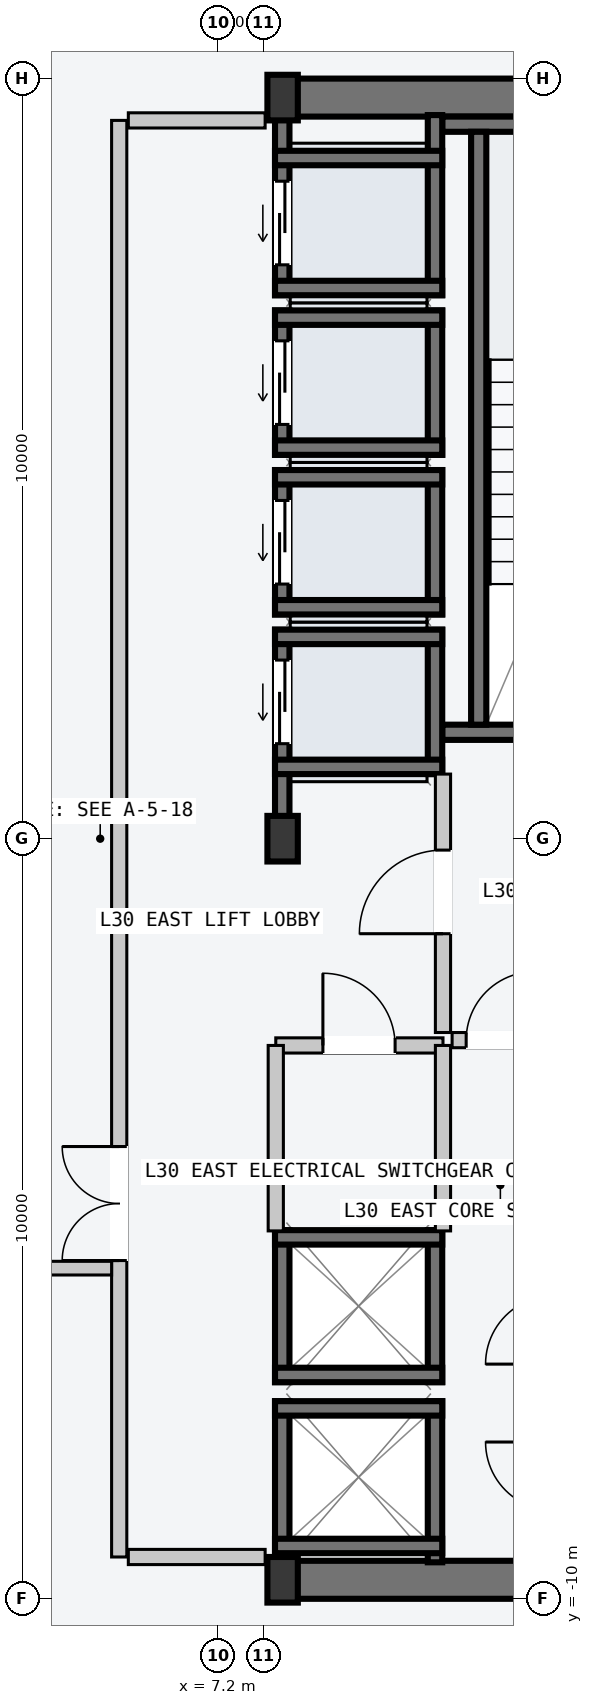
"""IFC4 building model, lengths in metres.
Left out: names, types, materials, properties, quantities, classifications, styles, units other than length and angle.
Written with IfcOpenShell. Run it as: python <this file> out.ifc"""

import sys

from ifc_helpers import new_model, si_unit, direction, frame, frame_2d, origin, origin_2d, place, context, subcontext, project, spatial, rectangle, i_section, extrude, element, fill, save


model = new_model("IFC4")
c1 = context("Model", 3, precision=1e-05, world=origin(), true_north=direction((0.0, 1.0)))
c2 = subcontext(c1, "Body", "Model", "MODEL_VIEW")
j1 = project(units=[si_unit("LENGTHUNIT", "METRE"), si_unit("PLANEANGLEUNIT", "RADIAN")], contexts=[c1])
p1 = place(None, origin())
s1 = spatial("IfcSite", under=j1, at=p1, CompositionType="ELEMENT")
p2 = place(p1, origin())
s2 = spatial("IfcBuilding", under=s1, at=p2, CompositionType="ELEMENT")
p3 = place(p2, frame((0.0, 0.0, 117.0)))
s3 = spatial("IfcBuildingStorey", under=s2, at=p3, CompositionType="ELEMENT", Elevation=117.0)
for number, where, z_axis, x_axis in (
    (1, (8.07, -9.75, -0.2), (0.0, 0.0, 1.0), (1.0, 0.0, 0.0)),
    (2, (8.07, 9.75, -0.2), (0.0, 0.0, 1.0), (1.0, 0.0, 0.0)),
):
    element("IfcWall", number, at=place(p3, frame(where, z_axis=z_axis, x_axis=x_axis)), inside=s3, PredefinedType="SHEAR", context=c2, shape_type="SweptSolid", body=[
        extrude(rectangle(XDim=6.46, YDim=0.5, at=frame_2d((3.23, 0.0))), origin(), (0.0, 0.0, 1.0), 3.6),
    ])
p4 = place(p3, frame((10.15, 1.4, -0.2), z_axis=(0.0, 0.0, 1.0), x_axis=(1.0, 0.0, 0.0)))
e3 = element("IfcWall", 3, at=p4, inside=s3, PredefinedType="SOLIDWALL", context=c2, shape_type="SweptSolid", body=[
    extrude(rectangle(XDim=4.1, YDim=0.2, at=frame_2d((2.05, 0.0))), origin(), (0.0, 0.0, 1.0), 3.6),
])
p5 = place(p4, frame((1.5, 0.0, 0.2)))
e4 = element("IfcOpeningElement", 4, at=p5, cuts=e3, PredefinedType="OPENING", context=c2, shape_type="SweptSolid", body=[
    extrude(rectangle(XDim=1.12, YDim=2.18, at=frame_2d((0.56, 1.09))), frame((0.0, 0.11, 0.0), z_axis=(0.0, -1.0, 0.0), x_axis=(1.0, 0.0, 0.0)), (0.0, 0.0, 1.0), 0.22),
])
p6 = place(p3, frame((10.15, 9.4, -0.2), z_axis=(0.0, 0.0, 1.0), x_axis=(1.0, 0.0, 0.0)))
e5 = element("IfcWall", 5, at=p6, inside=s3, PredefinedType="SOLIDWALL", context=c2, shape_type="SweptSolid", body=[
    extrude(rectangle(XDim=4.1, YDim=0.2, at=frame_2d((2.05, 0.0))), origin(), (0.0, 0.0, 1.0), 3.6),
])
p7 = place(p3, frame((10.63, 1.5, -0.2), z_axis=(0.0, 0.0, 1.0), x_axis=(0.0, 1.0, 0.0)))
e6 = element("IfcWall", 6, at=p7, inside=s3, PredefinedType="SOLIDWALL", context=c2, shape_type="SweptSolid", body=[
    extrude(rectangle(XDim=7.8, YDim=0.2, at=frame_2d((3.9, 0.0))), origin(), (0.0, 0.0, 1.0), 3.6),
])
for number, where, z_axis, x_axis in (
    (7, (8.05, -9.75, 0.0), (0.0, 0.0, 1.0), (1.0, 0.0, 0.0)),
    (8, (8.05, 0.0, 0.0), (0.0, 0.0, 1.0), (1.0, 0.0, 0.0)),
    (9, (8.05, 9.75, 0.0), (0.0, 0.0, 1.0), (1.0, 0.0, 0.0)),
):
    element("IfcColumn", number, at=place(p3, frame(where, z_axis=z_axis, x_axis=x_axis)), inside=s3, PredefinedType="COLUMN", context=c2, shape_type="SweptSolid", body=[
        extrude(i_section(OverallWidth=0.4, OverallDepth=0.6, WebThickness=0.022, FlangeThickness=0.036, at=origin_2d()), origin(), (0.0, 0.0, 1.0), 3.6),
    ])
p8 = place(p3, frame((8.045, 0.21, -0.2), z_axis=(0.0, 0.0, 1.0), x_axis=(0.0, 1.0, 0.0)))
e10 = element("IfcWall", 10, at=p8, inside=s3, PredefinedType="SOLIDWALL", context=c2, shape_type="SweptSolid", body=[
    extrude(rectangle(XDim=2.54, YDim=0.19, at=frame_2d((1.27, 0.0))), origin(), (0.0, 0.0, 1.0), 3.6),
])
p9 = place(p8, frame((1.04, 0.0, 0.2)))
e11 = element("IfcOpeningElement", 11, at=p9, cuts=e10, PredefinedType="OPENING", context=c2, shape_type="SweptSolid", body=[
    extrude(rectangle(XDim=1.1, YDim=2.2, at=frame_2d((0.55, 1.1))), frame((0.0, 0.105, 0.0), z_axis=(0.0, -1.0, 0.0), x_axis=(1.0, 0.0, 0.0)), (0.0, 0.0, 1.0), 0.21),
])
p10 = place(p3, frame((10.055, 0.85, -0.2), z_axis=(0.0, 0.0, 1.0), x_axis=(0.0, 1.0, 0.0)))
e12 = element("IfcWall", 12, at=p10, inside=s3, PredefinedType="SOLIDWALL", context=c2, shape_type="SweptSolid", body=[
    extrude(rectangle(XDim=1.9, YDim=0.19, at=frame_2d((0.95, 0.0))), origin(), (0.0, 0.0, 1.0), 3.6),
])
for number, where, z_axis, x_axis in (
    (13, (7.95, 2.655, -0.2), (0.0, 0.0, 1.0), (1.0, 0.0, 0.0)),
    (14, (7.95, 0.945, -0.2), (0.0, 0.0, 1.0), (1.0, 0.0, 0.0)),
):
    element("IfcWall", number, at=place(p3, frame(where, z_axis=z_axis, x_axis=x_axis)), inside=s3, PredefinedType="SOLIDWALL", context=c2, shape_type="SweptSolid", body=[
        extrude(rectangle(XDim=2.2, YDim=0.19, at=frame_2d((1.1, 0.0))), origin(), (0.0, 0.0, 1.0), 3.6),
    ])
p11 = place(p3, frame((8.045, 2.95, -0.2), z_axis=(0.0, 0.0, 1.0), x_axis=(0.0, 1.0, 0.0)))
e15 = element("IfcWall", 15, at=p11, inside=s3, PredefinedType="SOLIDWALL", context=c2, shape_type="SweptSolid", body=[
    extrude(rectangle(XDim=1.9, YDim=0.19, at=frame_2d((0.95, 0.0))), origin(), (0.0, 0.0, 1.0), 3.6),
])
p12 = place(p11, frame((0.4, 0.0, 0.2)))
e16 = element("IfcOpeningElement", 16, at=p12, cuts=e15, PredefinedType="OPENING", context=c2, shape_type="SweptSolid", body=[
    extrude(rectangle(XDim=1.1, YDim=2.2, at=frame_2d((0.55, 1.1))), frame((0.0, 0.105, 0.0), z_axis=(0.0, -1.0, 0.0), x_axis=(1.0, 0.0, 0.0)), (0.0, 0.0, 1.0), 0.21),
])
p13 = place(p3, frame((10.055, 2.95, -0.2), z_axis=(0.0, 0.0, 1.0), x_axis=(0.0, 1.0, 0.0)))
e17 = element("IfcWall", 17, at=p13, inside=s3, PredefinedType="SOLIDWALL", context=c2, shape_type="SweptSolid", body=[
    extrude(rectangle(XDim=1.9, YDim=0.19, at=frame_2d((0.95, 0.0))), origin(), (0.0, 0.0, 1.0), 3.6),
])
for number, where, z_axis, x_axis in (
    (18, (7.95, 4.755, -0.2), (0.0, 0.0, 1.0), (1.0, 0.0, 0.0)),
    (19, (7.95, 3.045, -0.2), (0.0, 0.0, 1.0), (1.0, 0.0, 0.0)),
):
    element("IfcWall", number, at=place(p3, frame(where, z_axis=z_axis, x_axis=x_axis)), inside=s3, PredefinedType="SOLIDWALL", context=c2, shape_type="SweptSolid", body=[
        extrude(rectangle(XDim=2.2, YDim=0.19, at=frame_2d((1.1, 0.0))), origin(), (0.0, 0.0, 1.0), 3.6),
    ])
p14 = place(p3, frame((8.045, 5.05, -0.2), z_axis=(0.0, 0.0, 1.0), x_axis=(0.0, 1.0, 0.0)))
e20 = element("IfcWall", 20, at=p14, inside=s3, PredefinedType="SOLIDWALL", context=c2, shape_type="SweptSolid", body=[
    extrude(rectangle(XDim=1.9, YDim=0.19, at=frame_2d((0.95, 0.0))), origin(), (0.0, 0.0, 1.0), 3.6),
])
p15 = place(p14, frame((0.4, 0.0, 0.2)))
e21 = element("IfcOpeningElement", 21, at=p15, cuts=e20, PredefinedType="OPENING", context=c2, shape_type="SweptSolid", body=[
    extrude(rectangle(XDim=1.1, YDim=2.2, at=frame_2d((0.55, 1.1))), frame((0.0, 0.105, 0.0), z_axis=(0.0, -1.0, 0.0), x_axis=(1.0, 0.0, 0.0)), (0.0, 0.0, 1.0), 0.21),
])
p16 = place(p3, frame((10.055, 5.05, -0.2), z_axis=(0.0, 0.0, 1.0), x_axis=(0.0, 1.0, 0.0)))
e22 = element("IfcWall", 22, at=p16, inside=s3, PredefinedType="SOLIDWALL", context=c2, shape_type="SweptSolid", body=[
    extrude(rectangle(XDim=1.9, YDim=0.19, at=frame_2d((0.95, 0.0))), origin(), (0.0, 0.0, 1.0), 3.6),
])
for number, where, z_axis, x_axis in (
    (23, (7.95, 6.855, -0.2), (0.0, 0.0, 1.0), (1.0, 0.0, 0.0)),
    (24, (7.95, 5.145, -0.2), (0.0, 0.0, 1.0), (1.0, 0.0, 0.0)),
):
    element("IfcWall", number, at=place(p3, frame(where, z_axis=z_axis, x_axis=x_axis)), inside=s3, PredefinedType="SOLIDWALL", context=c2, shape_type="SweptSolid", body=[
        extrude(rectangle(XDim=2.2, YDim=0.19, at=frame_2d((1.1, 0.0))), origin(), (0.0, 0.0, 1.0), 3.6),
    ])
p17 = place(p3, frame((8.045, 7.15, -0.2), z_axis=(0.0, 0.0, 1.0), x_axis=(0.0, 1.0, 0.0)))
e25 = element("IfcWall", 25, at=p17, inside=s3, PredefinedType="SOLIDWALL", context=c2, shape_type="SweptSolid", body=[
    extrude(rectangle(XDim=2.37, YDim=0.19, at=frame_2d((1.185, 0.0))), origin(), (0.0, 0.0, 1.0), 3.6),
])
p18 = place(p17, frame((0.4, 0.0, 0.2)))
e26 = element("IfcOpeningElement", 26, at=p18, cuts=e25, PredefinedType="OPENING", context=c2, shape_type="SweptSolid", body=[
    extrude(rectangle(XDim=1.1, YDim=2.2, at=frame_2d((0.55, 1.1))), frame((0.0, 0.105, 0.0), z_axis=(0.0, -1.0, 0.0), x_axis=(1.0, 0.0, 0.0)), (0.0, 0.0, 1.0), 0.21),
])
p19 = place(p3, frame((10.055, 7.15, -0.2), z_axis=(0.0, 0.0, 1.0), x_axis=(0.0, 1.0, 0.0)))
e27 = element("IfcWall", 27, at=p19, inside=s3, PredefinedType="SOLIDWALL", context=c2, shape_type="SweptSolid", body=[
    extrude(rectangle(XDim=2.37, YDim=0.19, at=frame_2d((1.185, 0.0))), origin(), (0.0, 0.0, 1.0), 3.6),
])
for number, where, z_axis, x_axis in (
    (28, (7.95, 8.955, -0.2), (0.0, 0.0, 1.0), (1.0, 0.0, 0.0)),
    (29, (7.95, 7.245, -0.2), (0.0, 0.0, 1.0), (1.0, 0.0, 0.0)),
):
    element("IfcWall", number, at=place(p3, frame(where, z_axis=z_axis, x_axis=x_axis)), inside=s3, PredefinedType="SOLIDWALL", context=c2, shape_type="SweptSolid", body=[
        extrude(rectangle(XDim=2.2, YDim=0.19, at=frame_2d((1.1, 0.0))), origin(), (0.0, 0.0, 1.0), 3.6),
    ])
for number, where, z_axis, x_axis in (
    (30, (8.045, -9.52, -0.2), (0.0, 0.0, 1.0), (0.0, 1.0, 0.0)),
    (31, (10.055, -9.52, -0.2), (0.0, 0.0, 1.0), (0.0, 1.0, 0.0)),
):
    element("IfcWall", number, at=place(p3, frame(where, z_axis=z_axis, x_axis=x_axis)), inside=s3, PredefinedType="SOLIDWALL", context=c2, shape_type="SweptSolid", body=[
        extrude(rectangle(XDim=2.12, YDim=0.19, at=frame_2d((1.06, 0.0))), origin(), (0.0, 0.0, 1.0), 3.6),
    ])
for number, where, z_axis, x_axis in (
    (32, (7.95, -7.495, -0.2), (0.0, 0.0, 1.0), (1.0, 0.0, 0.0)),
    (33, (7.95, -9.305, -0.2), (0.0, 0.0, 1.0), (1.0, 0.0, 0.0)),
):
    element("IfcWall", number, at=place(p3, frame(where, z_axis=z_axis, x_axis=x_axis)), inside=s3, PredefinedType="SOLIDWALL", context=c2, shape_type="SweptSolid", body=[
        extrude(rectangle(XDim=2.2, YDim=0.19, at=frame_2d((1.1, 0.0))), origin(), (0.0, 0.0, 1.0), 3.6),
    ])
for number, where, z_axis, x_axis in (
    (34, (8.045, -7.15, -0.2), (0.0, 0.0, 1.0), (0.0, 1.0, 0.0)),
    (35, (10.055, -7.15, -0.2), (0.0, 0.0, 1.0), (0.0, 1.0, 0.0)),
):
    element("IfcWall", number, at=place(p3, frame(where, z_axis=z_axis, x_axis=x_axis)), inside=s3, PredefinedType="SOLIDWALL", context=c2, shape_type="SweptSolid", body=[
        extrude(rectangle(XDim=2.0, YDim=0.19, at=frame_2d((1.0, 0.0))), origin(), (0.0, 0.0, 1.0), 3.6),
    ])
for number, where, z_axis, x_axis in (
    (36, (7.95, -5.245, -0.2), (0.0, 0.0, 1.0), (1.0, 0.0, 0.0)),
    (37, (7.95, -7.055, -0.2), (0.0, 0.0, 1.0), (1.0, 0.0, 0.0)),
):
    element("IfcWall", number, at=place(p3, frame(where, z_axis=z_axis, x_axis=x_axis)), inside=s3, PredefinedType="SOLIDWALL", context=c2, shape_type="SweptSolid", body=[
        extrude(rectangle(XDim=2.2, YDim=0.19, at=frame_2d((1.1, 0.0))), origin(), (0.0, 0.0, 1.0), 3.6),
    ])
p20 = place(p3, frame((5.9, -9.45, 0.0), z_axis=(0.0, 0.0, 1.0), x_axis=(0.0, 1.0, 0.0)))
e38 = element("IfcWall", 38, at=p20, inside=s3, PredefinedType="PARTITIONING", context=c2, shape_type="SweptSolid", body=[
    extrude(rectangle(XDim=18.9, YDim=0.2, at=frame_2d((9.45, 0.0))), origin(), (0.0, 0.0, 1.0), 3.4),
])
p21 = place(p20, frame((3.9, 0.0, 0.0)))
e39 = element("IfcOpeningElement", 39, at=p21, cuts=e38, PredefinedType="OPENING", context=c2, shape_type="SweptSolid", body=[
    extrude(rectangle(XDim=1.5, YDim=2.2, at=frame_2d((0.75, 1.1))), frame((0.0, 0.11, 0.0), z_axis=(0.0, -1.0, 0.0), x_axis=(1.0, 0.0, 0.0)), (0.0, 0.0, 1.0), 0.22),
])
for number, where, z_axis, x_axis in (
    (40, (6.02, -9.45, 0.0), (0.0, 0.0, 1.0), (1.0, 0.0, 0.0)),
    (41, (6.02, 9.45, 0.0), (0.0, 0.0, 1.0), (1.0, 0.0, 0.0)),
):
    element("IfcWall", number, at=place(p3, frame(where, z_axis=z_axis, x_axis=x_axis)), inside=s3, PredefinedType="PARTITIONING", context=c2, shape_type="SweptSolid", body=[
        extrude(rectangle(XDim=1.8, YDim=0.2, at=frame_2d((0.9, 0.0))), origin(), (0.0, 0.0, 1.0), 3.4),
    ])
p22 = place(p3, frame((10.16, -2.55, 0.0), z_axis=(0.0, 0.0, 1.0), x_axis=(0.0, 1.0, 0.0)))
e42 = element("IfcWall", 42, at=p22, inside=s3, PredefinedType="PARTITIONING", context=c2, shape_type="SweptSolid", body=[
    extrude(rectangle(XDim=3.4, YDim=0.2, at=frame_2d((1.7, 0.0))), origin(), (0.0, 0.0, 1.0), 3.4),
])
p23 = place(p22, frame((1.3, 0.0, 0.0)))
e43 = element("IfcOpeningElement", 43, at=p23, cuts=e42, PredefinedType="OPENING", context=c2, shape_type="SweptSolid", body=[
    extrude(rectangle(XDim=1.1, YDim=2.15, at=frame_2d((0.55, 1.075))), frame((0.0, 0.11, 0.0), z_axis=(0.0, -1.0, 0.0), x_axis=(1.0, 0.0, 0.0)), (0.0, 0.0, 1.0), 0.22),
])
p24 = place(p3, frame((10.28, -2.65, 0.0), z_axis=(0.0, 0.0, 1.0), x_axis=(1.0, 0.0, 0.0)))
e44 = element("IfcWall", 44, at=p24, inside=s3, PredefinedType="PARTITIONING", context=c2, shape_type="SweptSolid", body=[
    extrude(rectangle(XDim=1.27, YDim=0.2, at=frame_2d((0.635, 0.0))), origin(), (0.0, 0.0, 1.0), 3.4),
])
p25 = place(p24, frame((0.185, 0.0, 0.0)))
e45 = element("IfcOpeningElement", 45, at=p25, cuts=e44, PredefinedType="OPENING", context=c2, shape_type="SweptSolid", body=[
    extrude(rectangle(XDim=0.9, YDim=2.15, at=frame_2d((0.45, 1.075))), frame((0.0, 0.11, 0.0), z_axis=(0.0, -1.0, 0.0), x_axis=(1.0, 0.0, 0.0)), (0.0, 0.0, 1.0), 0.22),
])
p26 = place(p3, frame((7.96, -2.72, 0.0), z_axis=(0.0, 0.0, 1.0), x_axis=(1.0, 0.0, 0.0)))
e46 = element("IfcWall", 46, at=p26, inside=s3, PredefinedType="PARTITIONING", context=c2, shape_type="SweptSolid", body=[
    extrude(rectangle(XDim=2.2, YDim=0.2, at=frame_2d((1.1, 0.0))), origin(), (0.0, 0.0, 1.0), 3.4),
])
p27 = place(p26, frame((0.62, 0.0, 0.0)))
e47 = element("IfcOpeningElement", 47, at=p27, cuts=e46, PredefinedType="OPENING", context=c2, shape_type="SweptSolid", body=[
    extrude(rectangle(XDim=0.95, YDim=2.1, at=frame_2d((0.475, 1.05))), frame((0.0, 0.11, 0.0), z_axis=(0.0, -1.0, 0.0), x_axis=(1.0, 0.0, 0.0)), (0.0, 0.0, 1.0), 0.22),
])
for number, where, z_axis, x_axis in (
    (48, (7.96, -5.16, 0.0), (0.0, 0.0, 1.0), (0.0, 1.0, 0.0)),
    (49, (10.16, -5.16, 0.0), (0.0, 0.0, 1.0), (0.0, 1.0, 0.0)),
):
    element("IfcWall", number, at=place(p3, frame(where, z_axis=z_axis, x_axis=x_axis)), inside=s3, PredefinedType="PARTITIONING", context=c2, shape_type="SweptSolid", body=[
        extrude(rectangle(XDim=2.44, YDim=0.2, at=frame_2d((1.22, 0.0))), origin(), (0.0, 0.0, 1.0), 3.4),
    ])
p28 = place(p3, frame((-5.8, -5.65, 0.0), z_axis=(0.0, 0.0, 1.0), x_axis=(1.0, 0.0, 0.0)))
e50 = element("IfcWall", 50, at=p28, inside=s3, PredefinedType="PARTITIONING", context=c2, shape_type="SweptSolid", body=[
    extrude(rectangle(XDim=11.6, YDim=0.18, at=frame_2d((5.8, 0.0))), origin(), (0.0, 0.0, 1.0), 3.4),
])
p29 = place(p28, frame((5.1, 0.0, 0.0)))
e51 = element("IfcOpeningElement", 51, at=p29, cuts=e50, PredefinedType="OPENING", context=c2, shape_type="SweptSolid", body=[
    extrude(rectangle(XDim=1.4, YDim=2.2, at=frame_2d((0.7, 1.1))), frame((0.0, 0.1, 0.0), z_axis=(0.0, -1.0, 0.0), x_axis=(1.0, 0.0, 0.0)), (0.0, 0.0, 1.0), 0.2),
])
p30 = place(p9, origin())
e52 = element("IfcDoor", 52, at=p30, inside=s3, OperationType="SLIDING_TO_LEFT", PredefinedType="DOOR", context=c2, shape_type="SweptSolid", body=[
    extrude(rectangle(XDim=1.1, YDim=2.2, at=frame_2d((0.55, 1.1))), frame((0.0, 0.025, 0.0), z_axis=(0.0, -1.0, 0.0), x_axis=(1.0, 0.0, 0.0)), (0.0, 0.0, 1.0), 0.05),
])
fill(e11, e52)
p31 = place(p12, origin())
e53 = element("IfcDoor", 53, at=p31, inside=s3, OperationType="SLIDING_TO_LEFT", PredefinedType="DOOR", context=c2, shape_type="SweptSolid", body=[
    extrude(rectangle(XDim=1.1, YDim=2.2, at=frame_2d((0.55, 1.1))), frame((0.0, 0.025, 0.0), z_axis=(0.0, -1.0, 0.0), x_axis=(1.0, 0.0, 0.0)), (0.0, 0.0, 1.0), 0.05),
])
fill(e16, e53)
p32 = place(p15, origin())
e54 = element("IfcDoor", 54, at=p32, inside=s3, OperationType="SLIDING_TO_LEFT", PredefinedType="DOOR", context=c2, shape_type="SweptSolid", body=[
    extrude(rectangle(XDim=1.1, YDim=2.2, at=frame_2d((0.55, 1.1))), frame((0.0, 0.025, 0.0), z_axis=(0.0, -1.0, 0.0), x_axis=(1.0, 0.0, 0.0)), (0.0, 0.0, 1.0), 0.05),
])
fill(e21, e54)
p33 = place(p18, origin())
e55 = element("IfcDoor", 55, at=p33, inside=s3, OperationType="SLIDING_TO_LEFT", PredefinedType="DOOR", context=c2, shape_type="SweptSolid", body=[
    extrude(rectangle(XDim=1.1, YDim=2.2, at=frame_2d((0.55, 1.1))), frame((0.0, 0.025, 0.0), z_axis=(0.0, -1.0, 0.0), x_axis=(1.0, 0.0, 0.0)), (0.0, 0.0, 1.0), 0.05),
])
fill(e26, e55)
p34 = place(p21, origin())
e56 = element("IfcDoor", 56, at=p34, inside=s3, OperationType="DOUBLE_DOOR_SINGLE_SWING", PredefinedType="DOOR", context=c2, shape_type="SweptSolid", body=[
    extrude(rectangle(XDim=1.5, YDim=2.2, at=frame_2d((0.75, 1.1))), frame((0.0, 0.025, 0.0), z_axis=(0.0, -1.0, 0.0), x_axis=(1.0, 0.0, 0.0)), (0.0, 0.0, 1.0), 0.05),
])
fill(e39, e56)
p35 = place(p23, origin())
e57 = element("IfcDoor", 57, at=p35, inside=s3, OperationType="SINGLE_SWING_LEFT", PredefinedType="DOOR", context=c2, shape_type="SweptSolid", body=[
    extrude(rectangle(XDim=1.1, YDim=2.15, at=frame_2d((0.55, 1.075))), frame((0.0, 0.025, 0.0), z_axis=(0.0, -1.0, 0.0), x_axis=(1.0, 0.0, 0.0)), (0.0, 0.0, 1.0), 0.05),
])
fill(e43, e57)
p36 = place(p25, origin())
e58 = element("IfcDoor", 58, at=p36, inside=s3, OperationType="SINGLE_SWING_RIGHT", PredefinedType="DOOR", context=c2, shape_type="SweptSolid", body=[
    extrude(rectangle(XDim=0.9, YDim=2.15, at=frame_2d((0.45, 1.075))), frame((0.0, 0.025, 0.0), z_axis=(0.0, -1.0, 0.0), x_axis=(1.0, 0.0, 0.0)), (0.0, 0.0, 1.0), 0.05),
])
fill(e45, e58)
p37 = place(p27, origin())
e59 = element("IfcDoor", 59, at=p37, inside=s3, OperationType="SINGLE_SWING_LEFT", PredefinedType="DOOR", context=c2, shape_type="SweptSolid", body=[
    extrude(rectangle(XDim=0.95, YDim=2.1, at=frame_2d((0.475, 1.05))), frame((0.0, 0.025, 0.0), z_axis=(0.0, -1.0, 0.0), x_axis=(1.0, 0.0, 0.0)), (0.0, 0.0, 1.0), 0.05),
])
fill(e47, e59)
save(model, sys.argv[1])
